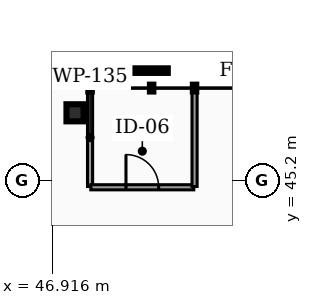
"""IFC4 building model, lengths in metres.
Left out: names, types, materials, properties, quantities, classifications, styles, units other than length and angle.
Written with IfcOpenShell. Run it as: python <this file> out.ifc"""

import sys

from ifc_helpers import new_model, si_unit, direction, frame, frame_2d, origin, origin_2d, place, context, subcontext, project, spatial, rectangle, hollow_rectangle, extrude, element, fill, save


model = new_model("IFC4")
c1 = context("Model", 3, precision=1e-05, world=origin(), true_north=direction((0.0, 1.0)))
c2 = subcontext(c1, "Body", "Model", "MODEL_VIEW")
j1 = project(units=[si_unit("LENGTHUNIT", "METRE"), si_unit("PLANEANGLEUNIT", "RADIAN")], contexts=[c1])
p1 = place(None, origin())
s1 = spatial("IfcSite", under=j1, at=p1, CompositionType="ELEMENT")
p2 = place(p1, origin())
s2 = spatial("IfcBuilding", under=s1, at=p2, CompositionType="ELEMENT")
p3 = place(p2, frame((0.0, 0.0, 285.6)))
s3 = spatial("IfcBuildingStorey", under=s2, at=p3, CompositionType="ELEMENT", Elevation=285.6)
p4 = place(p3, frame((47.517, 46.983, 0.0), z_axis=(-0.055233403773, -0.036617984749, 0.997801781067), x_axis=(0.552564232298, -0.833470316919, 0.0)))
e1 = element("IfcColumn", 1, at=p4, inside=s3, PredefinedType="COLUMN", context=c2, shape_type="SweptSolid", body=[
    extrude(hollow_rectangle(XDim=0.45, YDim=0.45, WallThickness=0.022, at=origin_2d()), origin(), (0.0, 0.0, 1.0), 3.187),
])
p5 = place(p3, frame((47.913, 45.043, 0.0), z_axis=(0.0, 0.0, 1.0), x_axis=(0.0, 1.0, 0.0)))
e2 = element("IfcWall", 2, at=p5, inside=s3, PredefinedType="PARTITIONING", context=c2, shape_type="SweptSolid", body=[
    extrude(rectangle(XDim=2.575, YDim=0.135, at=frame_2d((1.288, 0.0))), origin(), (0.0, 0.0, 1.0), 2.235),
])
p6 = place(p3, frame((47.933, 45.023, 0.0), z_axis=(0.0, 0.0, 1.0), x_axis=(1.0, 0.0, 0.0)))
e3 = element("IfcWall", 3, at=p6, inside=s3, PredefinedType="PARTITIONING", context=c2, shape_type="SweptSolid", body=[
    extrude(rectangle(XDim=2.71, YDim=0.135, at=frame_2d((1.355, 0.0))), origin(), (0.0, 0.0, 1.0), 2.235),
])
p7 = place(p6, frame((0.925, 0.0, 0.0)))
e4 = element("IfcOpeningElement", 4, at=p7, cuts=e3, PredefinedType="OPENING", context=c2, shape_type="SweptSolid", body=[
    extrude(rectangle(XDim=0.86, YDim=2.05, at=frame_2d((0.43, 1.025))), frame((0.0, 0.077, 0.0), z_axis=(0.0, -1.0, 0.0), x_axis=(1.0, 0.0, 0.0)), (0.0, 0.0, 1.0), 0.155),
])
p8 = place(p3, frame((50.663, 45.043, 0.0), z_axis=(0.0, 0.0, 1.0), x_axis=(0.0, 1.0, 0.0)))
e5 = element("IfcWall", 5, at=p8, inside=s3, PredefinedType="PARTITIONING", context=c2, shape_type="SweptSolid", body=[
    extrude(rectangle(XDim=2.575, YDim=0.135, at=frame_2d((1.288, 0.0))), origin(), (0.0, 0.0, 1.0), 2.235),
])
p9 = place(p7, origin())
e6 = element("IfcDoor", 6, at=p9, inside=s3, OperationType="SINGLE_SWING_LEFT", PredefinedType="DOOR", context=c2, shape_type="SweptSolid", body=[
    extrude(rectangle(XDim=0.86, YDim=2.05, at=frame_2d((0.43, 1.025))), frame((0.0, 0.025, 0.0), z_axis=(0.0, -1.0, 0.0), x_axis=(1.0, 0.0, 0.0)), (0.0, 0.0, 1.0), 0.05),
])
fill(e4, e6)
save(model, sys.argv[1])
